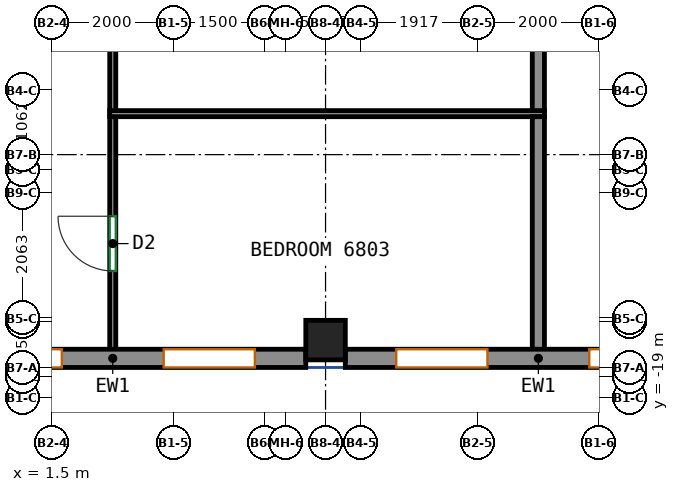
"""IFC4 building model, lengths in metres.
Left out: names, types, materials, properties, quantities, classifications, styles, units other than length and angle.
Written with IfcOpenShell. Run it as: python <this file> out.ifc"""

import sys

from ifc_helpers import new_model, si_unit, direction, frame, frame_2d, origin, origin_2d, place, context, subcontext, project, spatial, rectangle, extrude, source, transform, mapped, element, fill, save


model = new_model("IFC4")
c1 = context("Model", 3, precision=1e-05, world=origin(), true_north=direction((0.0, 1.0)))
c2 = subcontext(c1, "Body", "Model", "MODEL_VIEW")
j1 = project(units=[si_unit("LENGTHUNIT", "METRE"), si_unit("PLANEANGLEUNIT", "RADIAN")], contexts=[c1])
p1 = place(None, origin())
s1 = spatial("IfcSite", under=j1, at=p1, CompositionType="ELEMENT")
p2 = place(p1, origin())
s2 = spatial("IfcBuilding", under=s1, at=p2, CompositionType="ELEMENT")
p3 = place(p2, frame((0.0, 0.0, 277.2)))
s3 = spatial("IfcBuildingStorey", under=s2, at=p3, CompositionType="ELEMENT", Elevation=277.2)
m1 = source(origin(), c2, "Body", "SweptSolid", [
    extrude(rectangle(XDim=0.65, YDim=0.65, at=origin_2d()), origin(), (0.0, 0.0, 1.0), 3.12),
])
p4 = place(p3, frame((6.0, -18.05, 0.0), z_axis=(0.0, 0.0, 1.0), x_axis=(1.0, 0.0, 0.0)))
e1 = element("IfcColumn", 1, at=p4, inside=s3, PredefinedType="COLUMN", context=c2, shape_type="MappedRepresentation", body=[
    mapped(m1, transform((0.0, 0.0, 0.0))),
])
m2 = source(origin(), c2, "Body", "SweptSolid", [
    extrude(rectangle(XDim=6.35, YDim=0.3, at=frame_2d((3.175, 0.0))), origin(), (0.0, 0.0, 1.0), 3.12),
])
p5 = place(p3, frame((-0.675, -18.35, 0.0), z_axis=(0.0, 0.0, 1.0), x_axis=(1.0, 0.0, 0.0)))
e2 = element("IfcWall", 2, at=p5, inside=s3, PredefinedType="SOLIDWALL", context=c2, shape_type="MappedRepresentation", body=[
    mapped(m2, transform((0.0, 0.0, 0.0))),
])
p6 = place(p5, frame((0.837, 0.0, 0.8)))
e3 = element("IfcOpeningElement", 3, at=p6, cuts=e2, PredefinedType="OPENING", context=c2, shape_type="SweptSolid", body=[
    extrude(rectangle(XDim=1.5, YDim=2.05, at=frame_2d((0.75, 1.025))), frame((0.0, 0.16, 0.0), z_axis=(0.0, -1.0, 0.0), x_axis=(1.0, 0.0, 0.0)), (0.0, 0.0, 1.0), 0.32),
])
p7 = place(p5, frame((4.012, 0.0, 0.8)))
e4 = element("IfcOpeningElement", 4, at=p7, cuts=e2, PredefinedType="OPENING", context=c2, shape_type="SweptSolid", body=[
    extrude(rectangle(XDim=1.5, YDim=2.05, at=frame_2d((0.75, 1.025))), frame((0.0, 0.16, 0.0), z_axis=(0.0, -1.0, 0.0), x_axis=(1.0, 0.0, 0.0)), (0.0, 0.0, 1.0), 0.32),
])
p8 = place(p3, frame((6.325, -18.35, 0.0), z_axis=(0.0, 0.0, 1.0), x_axis=(1.0, 0.0, 0.0)))
e5 = element("IfcWall", 5, at=p8, inside=s3, PredefinedType="SOLIDWALL", context=c2, shape_type="MappedRepresentation", body=[
    mapped(m2, transform((0.0, 0.0, 0.0))),
])
p9 = place(p8, frame((0.837, 0.0, 0.8)))
e6 = element("IfcOpeningElement", 6, at=p9, cuts=e5, PredefinedType="OPENING", context=c2, shape_type="SweptSolid", body=[
    extrude(rectangle(XDim=1.5, YDim=2.05, at=frame_2d((0.75, 1.025))), frame((0.0, 0.16, 0.0), z_axis=(0.0, -1.0, 0.0), x_axis=(1.0, 0.0, 0.0)), (0.0, 0.0, 1.0), 0.32),
])
p10 = place(p8, frame((4.012, 0.0, 0.8)))
e7 = element("IfcOpeningElement", 7, at=p10, cuts=e5, PredefinedType="OPENING", context=c2, shape_type="SweptSolid", body=[
    extrude(rectangle(XDim=1.5, YDim=2.05, at=frame_2d((0.75, 1.025))), frame((0.0, 0.16, 0.0), z_axis=(0.0, -1.0, 0.0), x_axis=(1.0, 0.0, 0.0)), (0.0, 0.0, 1.0), 0.32),
])
p11 = place(p3, frame((2.5, -18.25, 0.0), z_axis=(0.0, 0.0, 1.0), x_axis=(0.0, 1.0, 0.0)))
e8 = element("IfcWall", 8, at=p11, inside=s3, PredefinedType="PARTITIONING", context=c2, shape_type="SweptSolid", body=[
    extrude(rectangle(XDim=3.884, YDim=0.1, at=frame_2d((1.942, 0.0))), origin(), (0.0, 0.0, 1.0), 3.12),
])
p12 = place(p11, frame((1.337, 0.0, 0.0)))
e9 = element("IfcOpeningElement", 9, at=p12, cuts=e8, PredefinedType="OPENING", context=c2, shape_type="SweptSolid", body=[
    extrude(rectangle(XDim=0.9, YDim=2.1, at=frame_2d((0.45, 1.05))), frame((0.0, 0.06, 0.0), z_axis=(0.0, -1.0, 0.0), x_axis=(1.0, 0.0, 0.0)), (0.0, 0.0, 1.0), 0.12),
])
p13 = place(p3, frame((2.5, -14.286, 0.0), z_axis=(0.0, 0.0, 1.0), x_axis=(0.0, 1.0, 0.0)))
e10 = element("IfcWall", 10, at=p13, inside=s3, PredefinedType="PARTITIONING", context=c2, shape_type="SweptSolid", body=[
    extrude(rectangle(XDim=3.834, YDim=0.1, at=frame_2d((1.917, 0.0))), origin(), (0.0, 0.0, 1.0), 3.12),
])
p14 = place(p3, frame((9.6, -14.326, 0.0), z_axis=(0.0, 0.0, 1.0), x_axis=(-1.0, 0.0, 0.0)))
e11 = element("IfcWall", 11, at=p14, inside=s3, PredefinedType="PARTITIONING", context=c2, shape_type="SweptSolid", body=[
    extrude(rectangle(XDim=7.15, YDim=0.1, at=frame_2d((3.575, 0.0))), origin(), (0.0, 0.0, 1.0), 3.12),
])
p15 = place(p3, frame((9.5, -18.25, 0.0), z_axis=(0.0, 0.0, 1.0), x_axis=(0.0, 1.0, 0.0)))
e12 = element("IfcWall", 12, at=p15, inside=s3, PredefinedType="PARTITIONING", context=c2, shape_type="SweptSolid", body=[
    extrude(rectangle(XDim=3.874, YDim=0.2, at=frame_2d((1.937, 0.0))), origin(), (0.0, 0.0, 1.0), 3.12),
])
p16 = place(p3, frame((9.5, -14.276, 0.0), z_axis=(0.0, 0.0, 1.0), x_axis=(0.0, 1.0, 0.0)))
e13 = element("IfcWall", 13, at=p16, inside=s3, PredefinedType="PARTITIONING", context=c2, shape_type="SweptSolid", body=[
    extrude(rectangle(XDim=3.824, YDim=0.2, at=frame_2d((1.912, 0.0))), origin(), (0.0, 0.0, 1.0), 3.12),
])
p17 = place(p6, origin())
e14 = element("IfcWindow", 14, at=p17, inside=s3, PartitioningType="SINGLE_PANEL", PredefinedType="WINDOW", context=c2, shape_type="SweptSolid", body=[
    extrude(rectangle(XDim=1.5, YDim=2.05, at=frame_2d((0.75, 1.025))), frame((0.0, 0.03, 0.0), z_axis=(0.0, -1.0, 0.0), x_axis=(1.0, 0.0, 0.0)), (0.0, 0.0, 1.0), 0.06),
])
fill(e3, e14)
p18 = place(p7, origin())
e15 = element("IfcWindow", 15, at=p18, inside=s3, PartitioningType="SINGLE_PANEL", PredefinedType="WINDOW", context=c2, shape_type="SweptSolid", body=[
    extrude(rectangle(XDim=1.5, YDim=2.05, at=frame_2d((0.75, 1.025))), frame((0.0, 0.03, 0.0), z_axis=(0.0, -1.0, 0.0), x_axis=(1.0, 0.0, 0.0)), (0.0, 0.0, 1.0), 0.06),
])
fill(e4, e15)
p19 = place(p9, origin())
e16 = element("IfcWindow", 16, at=p19, inside=s3, PartitioningType="SINGLE_PANEL", PredefinedType="WINDOW", context=c2, shape_type="SweptSolid", body=[
    extrude(rectangle(XDim=1.5, YDim=2.05, at=frame_2d((0.75, 1.025))), frame((0.0, 0.03, 0.0), z_axis=(0.0, -1.0, 0.0), x_axis=(1.0, 0.0, 0.0)), (0.0, 0.0, 1.0), 0.06),
])
fill(e6, e16)
p20 = place(p10, origin())
e17 = element("IfcWindow", 17, at=p20, inside=s3, PartitioningType="SINGLE_PANEL", PredefinedType="WINDOW", context=c2, shape_type="SweptSolid", body=[
    extrude(rectangle(XDim=1.5, YDim=2.05, at=frame_2d((0.75, 1.025))), frame((0.0, 0.03, 0.0), z_axis=(0.0, -1.0, 0.0), x_axis=(1.0, 0.0, 0.0)), (0.0, 0.0, 1.0), 0.06),
])
fill(e7, e17)
p21 = place(p12, origin())
e18 = element("IfcDoor", 18, at=p21, inside=s3, OperationType="SINGLE_SWING_RIGHT", PredefinedType="DOOR", context=c2, shape_type="SweptSolid", body=[
    extrude(rectangle(XDim=0.9, YDim=2.1, at=frame_2d((0.45, 1.05))), frame((0.0, 0.025, 0.0), z_axis=(0.0, -1.0, 0.0), x_axis=(1.0, 0.0, 0.0)), (0.0, 0.0, 1.0), 0.05),
])
fill(e9, e18)
save(model, sys.argv[1])
